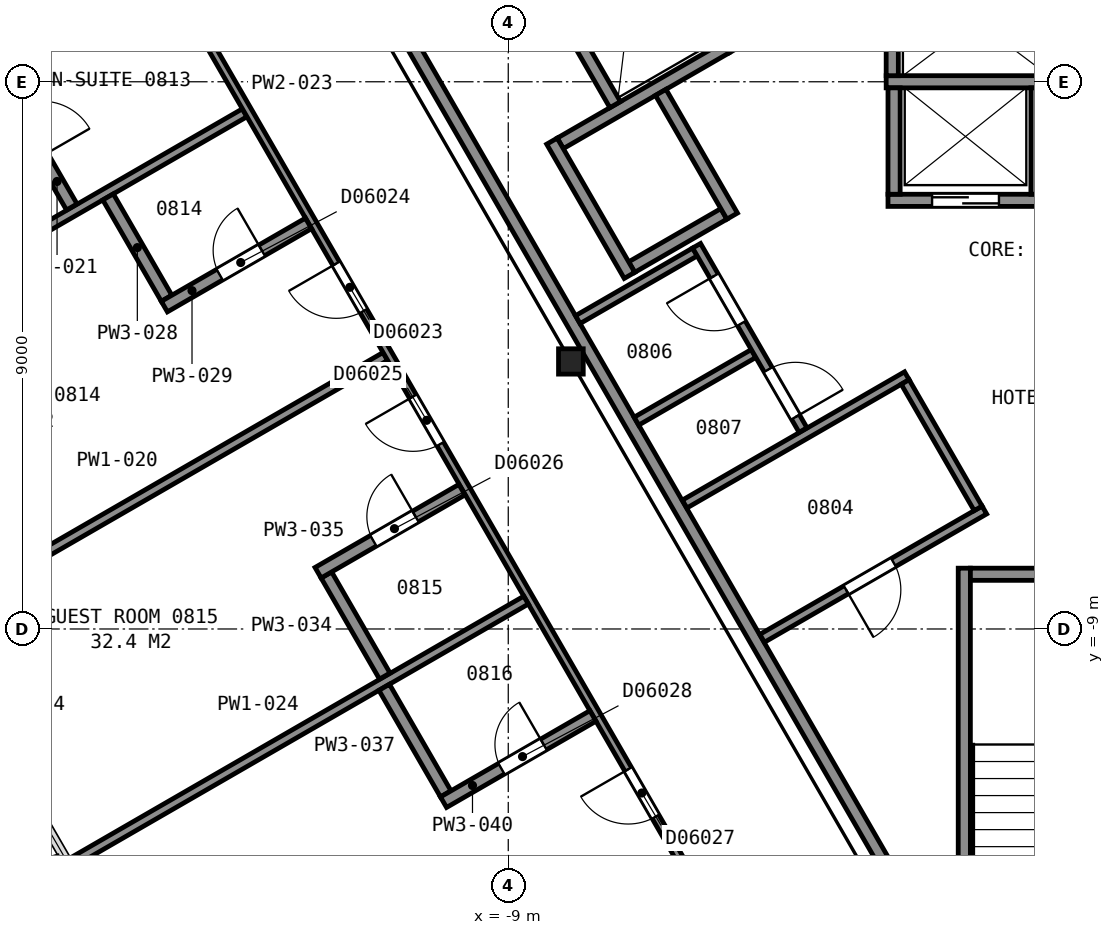
"""IFC4 building model, lengths in metres.
Left out: names, types, materials, properties, quantities, classifications, styles, units other than length and angle.
Written with IfcOpenShell. Run it as: python <this file> out.ifc"""

import sys

from ifc_helpers import new_model, si_unit, direction, frame, frame_2d, origin, origin_2d, place, context, subcontext, project, spatial, rectangle, i_section, extrude, element, fill, save


model = new_model("IFC4")
c1 = context("Model", 3, precision=1e-05, world=origin(), true_north=direction((0.0, 1.0)))
c2 = subcontext(c1, "Body", "Model", "MODEL_VIEW")
j1 = project(units=[si_unit("LENGTHUNIT", "METRE"), si_unit("PLANEANGLEUNIT", "RADIAN")], contexts=[c1])
p1 = place(None, origin())
s1 = spatial("IfcSite", under=j1, at=p1, CompositionType="ELEMENT")
p2 = place(p1, origin())
s2 = spatial("IfcBuilding", under=s1, at=p2, CompositionType="ELEMENT")
p3 = place(p2, frame((0.0, 0.0, 44.0)))
s3 = spatial("IfcBuildingStorey", under=s2, at=p3, CompositionType="ELEMENT", Elevation=44.0)
p4 = place(p3, frame((-7.97, -4.6, 0.0), z_axis=(0.0, 0.0, 1.0), x_axis=(1.0, 0.0, 0.0)))
e1 = element("IfcColumn", 1, at=p4, inside=s3, PredefinedType="COLUMN", context=c2, shape_type="SweptSolid", body=[
    extrude(i_section(OverallWidth=0.406, OverallDepth=0.417, WebThickness=0.03, FlangeThickness=0.048, FilletRadius=0.015, at=origin_2d()), origin(), (0.0, 0.0, 1.0), 3.6),
])
p5 = place(p3, frame((-1.5, -8.0, 0.0), z_axis=(0.0, 0.0, 1.0), x_axis=(0.0, -1.0, 0.0)))
e2 = element("IfcWall", 2, at=p5, inside=s3, PredefinedType="PARTITIONING", context=c2, shape_type="SweptSolid", body=[
    extrude(rectangle(XDim=12.0, YDim=0.2, at=frame_2d((6.0, 0.0))), origin(), (0.0, 0.0, 1.0), 3.35),
])
p6 = place(p3, frame((-1.4, -8.1, 0.0), z_axis=(0.0, 0.0, 1.0), x_axis=(1.0, 0.0, 0.0)))
e3 = element("IfcWall", 3, at=p6, inside=s3, PredefinedType="PARTITIONING", context=c2, shape_type="SweptSolid", body=[
    extrude(rectangle(XDim=2.8, YDim=0.2, at=frame_2d((1.4, 0.0))), origin(), (0.0, 0.0, 1.0), 3.35),
])
p7 = place(p3, frame((-2.755, -1.95, 0.0), z_axis=(0.0, 0.0, 1.0), x_axis=(1.0, 0.0, 0.0)))
e4 = element("IfcWall", 4, at=p7, inside=s3, PredefinedType="PARTITIONING", context=c2, shape_type="SweptSolid", body=[
    extrude(rectangle(XDim=2.55, YDim=0.2, at=frame_2d((1.275, 0.0))), origin(), (0.0, 0.0, 1.0), 3.6),
])
p8 = place(p7, frame((0.725, 0.0, 0.0)))
e5 = element("IfcOpeningElement", 5, at=p8, cuts=e4, PredefinedType="OPENING", context=c2, shape_type="SweptSolid", body=[
    extrude(rectangle(XDim=1.1, YDim=2.1, at=frame_2d((0.55, 1.05))), frame((0.0, 0.11, 0.0), z_axis=(0.0, -1.0, 0.0), x_axis=(1.0, 0.0, 0.0)), (0.0, 0.0, 1.0), 0.22),
])
p9 = place(p3, frame((-2.785, 0.0, 0.0), z_axis=(0.0, 0.0, 1.0), x_axis=(1.0, 0.0, 0.0)))
e6 = element("IfcWall", 6, at=p9, inside=s3, PredefinedType="PARTITIONING", context=c2, shape_type="SweptSolid", body=[
    extrude(rectangle(XDim=2.95, YDim=0.2, at=frame_2d((1.475, 0.0))), origin(), (0.0, 0.0, 1.0), 3.6),
])
p10 = place(p3, frame((-6.97, -3.048, 0.0), z_axis=(0.0, 0.0, 1.0), x_axis=(0.866036909293, 0.499980071345, 0.0)))
e7 = element("IfcWall", 7, at=p10, inside=s3, PredefinedType="PARTITIONING", context=c2, shape_type="SweptSolid", body=[
    extrude(rectangle(XDim=1.75, YDim=0.2, at=frame_2d((0.875, 0.0))), origin(), (0.0, 0.0, 1.0), 3.6),
])
p11 = place(p3, frame((-8.145, -1.013, 0.0), z_axis=(0.0, 0.0, 1.0), x_axis=(0.866016494683, 0.500015430699, 0.0)))
e8 = element("IfcWall", 8, at=p11, inside=s3, PredefinedType="PARTITIONING", context=c2, shape_type="SweptSolid", body=[
    extrude(rectangle(XDim=3.15, YDim=0.2, at=frame_2d((1.575, 0.0))), origin(), (0.0, 0.0, 1.0), 3.6),
])
for number, where, z_axis, x_axis in (
    (9, (-0.305, -1.85, 0.0), (0.0, 0.0, 1.0), (0.0, 1.0, 0.0)),
    (10, (-2.655, -1.85, 0.0), (0.0, 0.0, 1.0), (0.0, 1.0, 0.0)),
):
    element("IfcWall", number, at=place(p3, frame(where, z_axis=z_axis, x_axis=x_axis)), inside=s3, PredefinedType="PARTITIONING", context=c2, shape_type="SweptSolid", body=[
        extrude(rectangle(XDim=1.75, YDim=0.2, at=frame_2d((0.875, 0.0))), origin(), (0.0, 0.0, 1.0), 3.6),
    ])
p12 = place(p3, frame((-2.685, 0.1, 0.0), z_axis=(0.0, 0.0, 1.0), x_axis=(0.0, 1.0, 0.0)))
e11 = element("IfcWall", 11, at=p12, inside=s3, PredefinedType="PARTITIONING", context=c2, shape_type="SweptSolid", body=[
    extrude(rectangle(XDim=1.95, YDim=0.2, at=frame_2d((0.975, 0.0))), origin(), (0.0, 0.0, 1.0), 3.6),
])
p13 = place(p3, frame((-5.28, 0.525, 0.0), z_axis=(0.0, 0.0, 1.0), x_axis=(-0.500037662692, 0.866003658127, 0.0)))
e12 = element("IfcWall", 12, at=p13, inside=s3, PredefinedType="PARTITIONING", context=c2, shape_type="SweptSolid", body=[
    extrude(rectangle(XDim=2.95, YDim=0.2, at=frame_2d((1.475, 0.0))), origin(), (0.0, 0.0, 1.0), 3.6),
])
p14 = place(p13, frame((0.925, 0.0, 0.0)))
e13 = element("IfcOpeningElement", 13, at=p14, cuts=e12, PredefinedType="OPENING", context=c2, shape_type="SweptSolid", body=[
    extrude(rectangle(XDim=1.1, YDim=2.1, at=frame_2d((0.55, 1.05))), frame((0.0, 0.11, 0.0), z_axis=(0.0, -1.0, 0.0), x_axis=(1.0, 0.0, 0.0)), (0.0, 0.0, 1.0), 0.22),
])
p15 = place(p3, frame((-5.318, -2.21, 0.0), z_axis=(0.0, 0.0, 1.0), x_axis=(-0.499938297808, 0.866061024631, 0.0)))
e14 = element("IfcWall", 14, at=p15, inside=s3, PredefinedType="PARTITIONING", context=c2, shape_type="SweptSolid", body=[
    extrude(rectangle(XDim=2.35, YDim=0.2, at=frame_2d((1.175, 0.0))), origin(), (0.0, 0.0, 1.0), 3.6),
])
p16 = place(p3, frame((-7.242, -0.376, 0.0), z_axis=(0.0, 0.0, 1.0), x_axis=(-0.499996545922, 0.866027397988, 0.0)))
e15 = element("IfcWall", 15, at=p16, inside=s3, PredefinedType="PARTITIONING", context=c2, shape_type="SweptSolid", body=[
    extrude(rectangle(XDim=2.75, YDim=0.2, at=frame_2d((1.375, 0.0))), origin(), (0.0, 0.0, 1.0), 3.6),
])
p17 = place(p3, frame((-7.006, -3.185, 0.0), z_axis=(0.0, 0.0, 1.0), x_axis=(-0.499990435942, 0.866030925526, 0.0)))
e16 = element("IfcWall", 16, at=p17, inside=s3, PredefinedType="PARTITIONING", context=c2, shape_type="SweptSolid", body=[
    extrude(rectangle(XDim=2.55, YDim=0.2, at=frame_2d((1.275, 0.0))), origin(), (0.0, 0.0, 1.0), 3.6),
])
p18 = place(p3, frame((-13.664, 5.946, 0.0), z_axis=(0.0, 0.0, 1.0), x_axis=(0.499994327219, -0.866028678941, 0.0)))
e17 = element("IfcWall", 17, at=p18, inside=s3, PredefinedType="PARTITIONING", context=c2, shape_type="SweptSolid", body=[
    extrude(rectangle(XDim=23.968, YDim=0.2, at=frame_2d((11.984, 0.0))), origin(), (0.0, 0.0, 1.0), 3.35),
])
p19 = place(p3, frame((-7.856, -3.912, 0.0), z_axis=(0.0, 0.0, 1.0), x_axis=(0.865971748, 0.500092923031, 0.0)))
e18 = element("IfcWall", 18, at=p19, inside=s3, PredefinedType="PARTITIONING", context=c2, shape_type="SweptSolid", body=[
    extrude(rectangle(XDim=2.225, YDim=0.15, at=frame_2d((1.112, 0.0))), origin(), (0.0, 0.0, 1.0), 3.35),
])
p20 = place(p3, frame((-6.892, -5.582, 0.0), z_axis=(0.0, 0.0, 1.0), x_axis=(0.865944298464, 0.500140452231, 0.0)))
e19 = element("IfcWall", 19, at=p20, inside=s3, PredefinedType="PARTITIONING", context=c2, shape_type="SweptSolid", body=[
    extrude(rectangle(XDim=2.224, YDim=0.15, at=frame_2d((1.112, 0.0))), origin(), (0.0, 0.0, 1.0), 3.35),
])
p21 = place(p3, frame((-6.1, -6.946, 0.0), z_axis=(0.0, 0.0, 1.0), x_axis=(0.866038200431, 0.499977834903, 0.0)))
e20 = element("IfcWall", 20, at=p21, inside=s3, PredefinedType="PARTITIONING", context=c2, shape_type="SweptSolid", body=[
    extrude(rectangle(XDim=4.22, YDim=0.15, at=frame_2d((2.11, 0.0))), origin(), (0.0, 0.0, 1.0), 3.35),
])
p22 = place(p3, frame((-4.152, -5.729, 0.0), z_axis=(0.0, 0.0, 1.0), x_axis=(-0.500024287448, 0.866011380966, 0.0)))
e21 = element("IfcWall", 21, at=p22, inside=s3, PredefinedType="PARTITIONING", context=c2, shape_type="SweptSolid", body=[
    extrude(rectangle(XDim=3.501, YDim=0.15, at=frame_2d((1.75, 0.0))), origin(), (0.0, 0.0, 1.0), 3.35),
])
p23 = place(p22, frame((2.026, 0.0, 0.0)))
e22 = element("IfcOpeningElement", 22, at=p23, cuts=e21, PredefinedType="OPENING", context=c2, shape_type="SweptSolid", body=[
    extrude(rectangle(XDim=0.9, YDim=2.1, at=frame_2d((0.45, 1.05))), frame((0.0, 0.085, 0.0), z_axis=(0.0, -1.0, 0.0), x_axis=(1.0, 0.0, 0.0)), (0.0, 0.0, 1.0), 0.17),
])
p24 = place(p22, frame((0.248, 0.0, 0.0)))
e23 = element("IfcOpeningElement", 23, at=p24, cuts=e21, PredefinedType="OPENING", context=c2, shape_type="SweptSolid", body=[
    extrude(rectangle(XDim=0.9, YDim=2.1, at=frame_2d((0.45, 1.05))), frame((0.0, 0.085, 0.0), z_axis=(0.0, -1.0, 0.0), x_axis=(1.0, 0.0, 0.0)), (0.0, 0.0, 1.0), 0.17),
])
p25 = place(p3, frame((-4.825, -9.154, 0.0), z_axis=(0.0, 0.0, 1.0), x_axis=(0.866023738697, 0.500002884005, 0.0)))
e24 = element("IfcWall", 24, at=p25, inside=s3, PredefinedType="PARTITIONING", context=c2, shape_type="SweptSolid", body=[
    extrude(rectangle(XDim=4.22, YDim=0.15, at=frame_2d((2.11, 0.0))), origin(), (0.0, 0.0, 1.0), 3.35),
])
p26 = place(p25, frame((1.595, 0.0, 0.0)))
e25 = element("IfcOpeningElement", 25, at=p26, cuts=e24, PredefinedType="OPENING", context=c2, shape_type="SweptSolid", body=[
    extrude(rectangle(XDim=0.9, YDim=2.1, at=frame_2d((0.45, 1.05))), frame((0.0, 0.085, 0.0), z_axis=(0.0, -1.0, 0.0), x_axis=(1.0, 0.0, 0.0)), (0.0, 0.0, 1.0), 0.17),
])
p27 = place(p3, frame((-2.472, -4.938, 0.0), z_axis=(0.0, 0.0, 1.0), x_axis=(0.500045362686, -0.865999212041, 0.0)))
e26 = element("IfcWall", 26, at=p27, inside=s3, PredefinedType="PARTITIONING", context=c2, shape_type="SweptSolid", body=[
    extrude(rectangle(XDim=2.4, YDim=0.15, at=frame_2d((1.2, 0.0))), origin(), (0.0, 0.0, 1.0), 3.35),
])
p28 = place(p3, frame((-23.693, 0.247, 0.0), z_axis=(0.0, 0.0, 1.0), x_axis=(0.866031705461, 0.499989085017, 0.0)))
e27 = element("IfcWall", 27, at=p28, inside=s3, PredefinedType="PARTITIONING", context=c2, shape_type="SweptSolid", body=[
    extrude(rectangle(XDim=8.587, YDim=0.15, at=frame_2d((4.293, 0.0))), origin(), (0.0, 0.0, 1.0), 2.613),
])
p29 = place(p3, frame((-20.775, -4.806, 0.0), z_axis=(0.0, 0.0, 1.0), x_axis=(0.865995804368, 0.50005126419, 0.0)))
e28 = element("IfcWall", 28, at=p29, inside=s3, PredefinedType="PARTITIONING", context=c2, shape_type="SweptSolid", body=[
    extrude(rectangle(XDim=8.591, YDim=0.15, at=frame_2d((4.295, 0.0))), origin(), (0.0, 0.0, 1.0), 2.613),
])
p30 = place(p3, frame((-18.462, -8.813, 0.0), z_axis=(0.0, 0.0, 1.0), x_axis=(0.866029425019, 0.499993034952, 0.0)))
e29 = element("IfcWall", 29, at=p30, inside=s3, PredefinedType="PARTITIONING", context=c2, shape_type="SweptSolid", body=[
    extrude(rectangle(XDim=8.591, YDim=0.15, at=frame_2d((4.296, 0.0))), origin(), (0.0, 0.0, 1.0), 2.613),
])
p31 = place(p3, frame((-17.588, 0.382, 0.0), z_axis=(0.0, 0.0, 1.0), x_axis=(0.499984757355, -0.866034203951, 0.0)))
e30 = element("IfcWall", 30, at=p31, inside=s3, PredefinedType="PARTITIONING", context=c2, shape_type="SweptSolid", body=[
    extrude(rectangle(XDim=2.82, YDim=0.2, at=frame_2d((1.41, 0.0))), origin(), (0.0, 0.0, 1.0), 2.613),
])
p32 = place(p31, frame((0.95, 0.0, 0.0)))
e31 = element("IfcOpeningElement", 31, at=p32, cuts=e30, PredefinedType="OPENING", context=c2, shape_type="SweptSolid", body=[
    extrude(rectangle(XDim=0.9, YDim=2.1, at=frame_2d((0.45, 1.05))), frame((0.0, 0.11, 0.0), z_axis=(0.0, -1.0, 0.0), x_axis=(1.0, 0.0, 0.0)), (0.0, 0.0, 1.0), 0.22),
])
p33 = place(p3, frame((-17.725, 0.419, 0.0), z_axis=(0.0, 0.0, 1.0), x_axis=(0.865960142641, 0.500113018585, 0.0)))
e32 = element("IfcWall", 32, at=p33, inside=s3, PredefinedType="PARTITIONING", context=c2, shape_type="SweptSolid", body=[
    extrude(rectangle(XDim=3.337, YDim=0.2, at=frame_2d((1.668, 0.0))), origin(), (0.0, 0.0, 1.0), 2.613),
])
p34 = place(p3, frame((-3.766, -16.958, 0.0), z_axis=(0.0, 0.0, 1.0), x_axis=(-0.500024758804, 0.866011108811, 0.0)))
e33 = element("IfcWall", 33, at=p34, inside=s3, PredefinedType="PARTITIONING", context=c2, shape_type="SweptSolid", body=[
    extrude(rectangle(XDim=26.402, YDim=0.125, at=frame_2d((13.201, 0.0))), origin(), (0.0, 0.0, 1.0), 2.613),
])
p35 = place(p34, frame((25.139, 0.0, 0.0)))
e34 = element("IfcOpeningElement", 34, at=p35, cuts=e33, PredefinedType="OPENING", context=c2, shape_type="SweptSolid", body=[
    extrude(rectangle(XDim=0.9, YDim=2.1, at=frame_2d((0.45, 1.05))), frame((0.0, 0.073, 0.0), z_axis=(0.0, -1.0, 0.0), x_axis=(1.0, 0.0, 0.0)), (0.0, 0.0, 1.0), 0.145),
])
p36 = place(p34, frame((22.963, 0.0, 0.0)))
e35 = element("IfcOpeningElement", 35, at=p36, cuts=e33, PredefinedType="OPENING", context=c2, shape_type="SweptSolid", body=[
    extrude(rectangle(XDim=1.0, YDim=2.1, at=frame_2d((0.5, 1.05))), frame((0.0, 0.073, 0.0), z_axis=(0.0, -1.0, 0.0), x_axis=(1.0, 0.0, 0.0)), (0.0, 0.0, 1.0), 0.145),
])
p37 = place(p34, frame((15.228, 0.0, 0.0)))
e36 = element("IfcOpeningElement", 36, at=p37, cuts=e33, PredefinedType="OPENING", context=c2, shape_type="SweptSolid", body=[
    extrude(rectangle(XDim=0.9, YDim=2.1, at=frame_2d((0.45, 1.05))), frame((0.0, 0.073, 0.0), z_axis=(0.0, -1.0, 0.0), x_axis=(1.0, 0.0, 0.0)), (0.0, 0.0, 1.0), 0.145),
])
p38 = place(p34, frame((12.702, 0.0, 0.0)))
e37 = element("IfcOpeningElement", 37, at=p38, cuts=e33, PredefinedType="OPENING", context=c2, shape_type="SweptSolid", body=[
    extrude(rectangle(XDim=0.9, YDim=2.1, at=frame_2d((0.45, 1.05))), frame((0.0, 0.073, 0.0), z_axis=(0.0, -1.0, 0.0), x_axis=(1.0, 0.0, 0.0)), (0.0, 0.0, 1.0), 0.145),
])
p39 = place(p34, frame((5.624, 0.0, 0.0)))
e38 = element("IfcOpeningElement", 38, at=p39, cuts=e33, PredefinedType="OPENING", context=c2, shape_type="SweptSolid", body=[
    extrude(rectangle(XDim=0.9, YDim=2.1, at=frame_2d((0.45, 1.05))), frame((0.0, 0.073, 0.0), z_axis=(0.0, -1.0, 0.0), x_axis=(1.0, 0.0, 0.0)), (0.0, 0.0, 1.0), 0.145),
])
p40 = place(p34, frame((2.843, 0.0, 0.0)))
e39 = element("IfcOpeningElement", 39, at=p40, cuts=e33, PredefinedType="OPENING", context=c2, shape_type="SweptSolid", body=[
    extrude(rectangle(XDim=0.9, YDim=2.1, at=frame_2d((0.45, 1.05))), frame((0.0, 0.073, 0.0), z_axis=(0.0, -1.0, 0.0), x_axis=(1.0, 0.0, 0.0)), (0.0, 0.0, 1.0), 0.145),
])
p41 = place(p3, frame((-16.148, -12.821, 0.0), z_axis=(0.0, 0.0, 1.0), x_axis=(0.866036528751, 0.499980730498, 0.0)))
e40 = element("IfcWall", 40, at=p41, inside=s3, PredefinedType="PARTITIONING", context=c2, shape_type="SweptSolid", body=[
    extrude(rectangle(XDim=8.592, YDim=0.15, at=frame_2d((4.296, 0.0))), origin(), (0.0, 0.0, 1.0), 2.613),
])
p42 = place(p3, frame((-15.582, -1.894, 0.0), z_axis=(0.0, 0.0, 1.0), x_axis=(0.500026156197, -0.86601030197, 0.0)))
e41 = element("IfcWall", 41, at=p42, inside=s3, PredefinedType="PARTITIONING", context=c2, shape_type="SweptSolid", body=[
    extrude(rectangle(XDim=1.925, YDim=0.2, at=frame_2d((0.963, 0.0))), origin(), (0.0, 0.0, 1.0), 2.613),
])
p43 = place(p3, frame((-14.656, -3.698, 0.0), z_axis=(0.0, 0.0, 1.0), x_axis=(0.866005850709, 0.50003386539, 0.0)))
e42 = element("IfcWall", 42, at=p43, inside=s3, PredefinedType="PARTITIONING", context=c2, shape_type="SweptSolid", body=[
    extrude(rectangle(XDim=2.737, YDim=0.2, at=frame_2d((1.369, 0.0))), origin(), (0.0, 0.0, 1.0), 2.613),
])
p44 = place(p43, frame((1.05, 0.0, 0.0)))
e43 = element("IfcOpeningElement", 43, at=p44, cuts=e42, PredefinedType="OPENING", context=c2, shape_type="SweptSolid", body=[
    extrude(rectangle(XDim=0.8, YDim=2.1, at=frame_2d((0.4, 1.05))), frame((0.0, 0.11, 0.0), z_axis=(0.0, -1.0, 0.0), x_axis=(1.0, 0.0, 0.0)), (0.0, 0.0, 1.0), 0.22),
])
p45 = place(p3, frame((-11.991, -8.112, 0.0), z_axis=(0.0, 0.0, 1.0), x_axis=(0.499913221443, -0.866075499611, 0.0)))
e44 = element("IfcWall", 44, at=p45, inside=s3, PredefinedType="PARTITIONING", context=c2, shape_type="SweptSolid", body=[
    extrude(rectangle(XDim=1.92, YDim=0.2, at=frame_2d((0.96, 0.0))), origin(), (0.0, 0.0, 1.0), 2.613),
])
p46 = place(p3, frame((-9.761, -6.709, 0.0), z_axis=(0.0, 0.0, 1.0), x_axis=(-0.866012976267, -0.500021524473, 0.0)))
e45 = element("IfcWall", 45, at=p46, inside=s3, PredefinedType="PARTITIONING", context=c2, shape_type="SweptSolid", body=[
    extrude(rectangle(XDim=2.732, YDim=0.2, at=frame_2d((1.366, 0.0))), origin(), (0.0, 0.0, 1.0), 2.613),
])
p47 = place(p46, frame((0.882, 0.0, 0.0)))
e46 = element("IfcOpeningElement", 46, at=p47, cuts=e45, PredefinedType="OPENING", context=c2, shape_type="SweptSolid", body=[
    extrude(rectangle(XDim=0.8, YDim=2.1, at=frame_2d((0.4, 1.05))), frame((0.0, 0.11, 0.0), z_axis=(0.0, -1.0, 0.0), x_axis=(1.0, 0.0, 0.0)), (0.0, 0.0, 1.0), 0.22),
])
p48 = place(p3, frame((-11.041, -9.959, 0.0), z_axis=(0.0, 0.0, 1.0), x_axis=(0.500042536776, -0.866000843773, 0.0)))
e47 = element("IfcWall", 47, at=p48, inside=s3, PredefinedType="PARTITIONING", context=c2, shape_type="SweptSolid", body=[
    extrude(rectangle(XDim=2.025, YDim=0.2, at=frame_2d((1.012, 0.0))), origin(), (0.0, 0.0, 1.0), 2.613),
])
p49 = place(p3, frame((-10.065, -11.849, 0.0), z_axis=(0.0, 0.0, 1.0), x_axis=(0.866048046904, 0.499960778915, 0.0)))
e48 = element("IfcWall", 48, at=p49, inside=s3, PredefinedType="PARTITIONING", context=c2, shape_type="SweptSolid", body=[
    extrude(rectangle(XDim=2.838, YDim=0.2, at=frame_2d((1.419, 0.0))), origin(), (0.0, 0.0, 1.0), 2.613),
])
p50 = place(p49, frame((1.1, 0.0, 0.0)))
e49 = element("IfcOpeningElement", 49, at=p50, cuts=e48, PredefinedType="OPENING", context=c2, shape_type="SweptSolid", body=[
    extrude(rectangle(XDim=0.8, YDim=2.1, at=frame_2d((0.4, 1.05))), frame((0.0, 0.11, 0.0), z_axis=(0.0, -1.0, 0.0), x_axis=(1.0, 0.0, 0.0)), (0.0, 0.0, 1.0), 0.22),
])
p51 = place(p8, origin())
e50 = element("IfcDoor", 50, at=p51, inside=s3, OperationType="SLIDING_TO_RIGHT", PredefinedType="DOOR", context=c2, shape_type="SweptSolid", body=[
    extrude(rectangle(XDim=1.1, YDim=2.1, at=frame_2d((0.55, 1.05))), frame((0.0, 0.025, 0.0), z_axis=(0.0, -1.0, 0.0), x_axis=(1.0, 0.0, 0.0)), (0.0, 0.0, 1.0), 0.05),
])
fill(e5, e50)
p52 = place(p23, origin())
e51 = element("IfcDoor", 51, at=p52, inside=s3, OperationType="SINGLE_SWING_RIGHT", PredefinedType="DOOR", context=c2, shape_type="SweptSolid", body=[
    extrude(rectangle(XDim=0.9, YDim=2.1, at=frame_2d((0.45, 1.05))), frame((0.0, 0.025, 0.0), z_axis=(0.0, -1.0, 0.0), x_axis=(1.0, 0.0, 0.0)), (0.0, 0.0, 1.0), 0.05),
])
fill(e22, e51)
p53 = place(p24, origin())
e52 = element("IfcDoor", 52, at=p53, inside=s3, OperationType="SINGLE_SWING_LEFT", PredefinedType="DOOR", context=c2, shape_type="SweptSolid", body=[
    extrude(rectangle(XDim=0.9, YDim=2.1, at=frame_2d((0.45, 1.05))), frame((0.0, 0.025, 0.0), z_axis=(0.0, -1.0, 0.0), x_axis=(1.0, 0.0, 0.0)), (0.0, 0.0, 1.0), 0.05),
])
fill(e23, e52)
p54 = place(p26, origin())
e53 = element("IfcDoor", 53, at=p54, inside=s3, OperationType="SINGLE_SWING_LEFT", PredefinedType="DOOR", context=c2, shape_type="SweptSolid", body=[
    extrude(rectangle(XDim=0.9, YDim=2.1, at=frame_2d((0.45, 1.05))), frame((0.0, 0.025, 0.0), z_axis=(0.0, -1.0, 0.0), x_axis=(1.0, 0.0, 0.0)), (0.0, 0.0, 1.0), 0.05),
])
fill(e25, e53)
p55 = place(p37, origin())
e54 = element("IfcDoor", 54, at=p55, inside=s3, OperationType="SINGLE_SWING_RIGHT", PredefinedType="DOOR", context=c2, shape_type="SweptSolid", body=[
    extrude(rectangle(XDim=0.9, YDim=2.1, at=frame_2d((0.45, 1.05))), frame((0.0, 0.025, 0.0), z_axis=(0.0, -1.0, 0.0), x_axis=(1.0, 0.0, 0.0)), (0.0, 0.0, 1.0), 0.05),
])
fill(e36, e54)
p56 = place(p38, origin())
e55 = element("IfcDoor", 55, at=p56, inside=s3, OperationType="SINGLE_SWING_RIGHT", PredefinedType="DOOR", context=c2, shape_type="SweptSolid", body=[
    extrude(rectangle(XDim=0.9, YDim=2.1, at=frame_2d((0.45, 1.05))), frame((0.0, 0.025, 0.0), z_axis=(0.0, -1.0, 0.0), x_axis=(1.0, 0.0, 0.0)), (0.0, 0.0, 1.0), 0.05),
])
fill(e37, e55)
p57 = place(p39, origin())
e56 = element("IfcDoor", 56, at=p57, inside=s3, OperationType="SINGLE_SWING_RIGHT", PredefinedType="DOOR", context=c2, shape_type="SweptSolid", body=[
    extrude(rectangle(XDim=0.9, YDim=2.1, at=frame_2d((0.45, 1.05))), frame((0.0, 0.025, 0.0), z_axis=(0.0, -1.0, 0.0), x_axis=(1.0, 0.0, 0.0)), (0.0, 0.0, 1.0), 0.05),
])
fill(e38, e56)
p58 = place(p44, origin())
e57 = element("IfcDoor", 57, at=p58, inside=s3, OperationType="SINGLE_SWING_RIGHT", PredefinedType="DOOR", context=c2, shape_type="SweptSolid", body=[
    extrude(rectangle(XDim=0.8, YDim=2.1, at=frame_2d((0.4, 1.05))), frame((0.0, 0.025, 0.0), z_axis=(0.0, -1.0, 0.0), x_axis=(1.0, 0.0, 0.0)), (0.0, 0.0, 1.0), 0.05),
])
fill(e43, e57)
p59 = place(p47, origin())
e58 = element("IfcDoor", 58, at=p59, inside=s3, OperationType="SINGLE_SWING_LEFT", PredefinedType="DOOR", context=c2, shape_type="SweptSolid", body=[
    extrude(rectangle(XDim=0.8, YDim=2.1, at=frame_2d((0.4, 1.05))), frame((0.0, 0.025, 0.0), z_axis=(0.0, -1.0, 0.0), x_axis=(1.0, 0.0, 0.0)), (0.0, 0.0, 1.0), 0.05),
])
fill(e46, e58)
p60 = place(p50, origin())
e59 = element("IfcDoor", 59, at=p60, inside=s3, OperationType="SINGLE_SWING_RIGHT", PredefinedType="DOOR", context=c2, shape_type="SweptSolid", body=[
    extrude(rectangle(XDim=0.8, YDim=2.1, at=frame_2d((0.4, 1.05))), frame((0.0, 0.025, 0.0), z_axis=(0.0, -1.0, 0.0), x_axis=(1.0, 0.0, 0.0)), (0.0, 0.0, 1.0), 0.05),
])
fill(e49, e59)
save(model, sys.argv[1])
